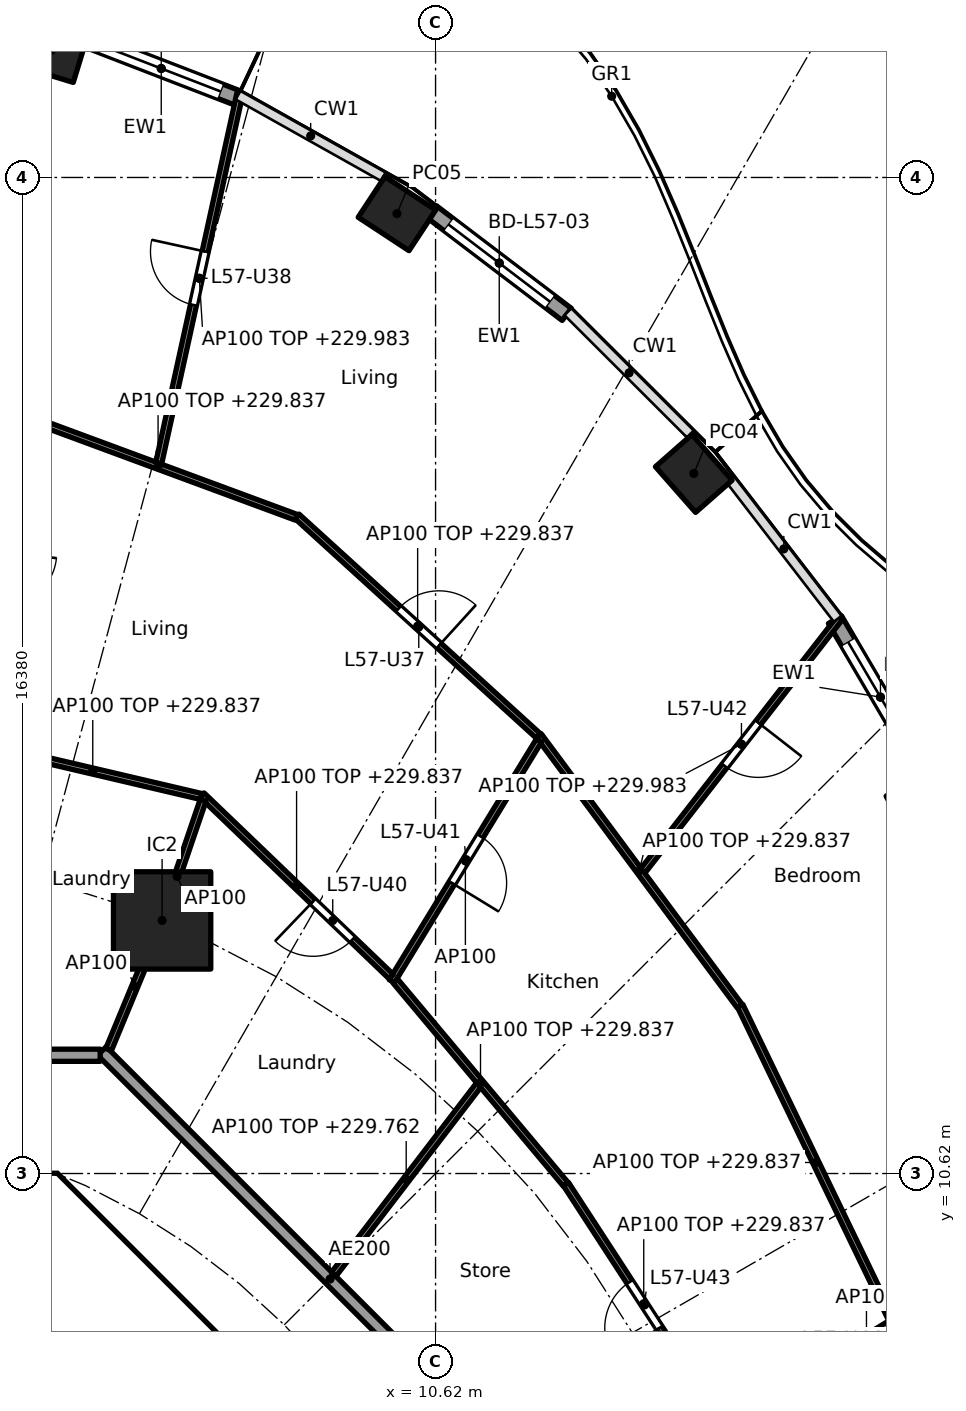
"""IFC4 building model, lengths in metres.
Left out: names, types, materials, properties, quantities, classifications, styles, units other than length and angle.
Written with IfcOpenShell. Run it as: python <this file> out.ifc"""

import sys

from ifc_helpers import new_model, si_unit, direction, frame, frame_2d, origin, origin_2d, place, context, subcontext, project, spatial, polyline, rectangle, hollow_rectangle, outline, extrude, element, fill, save


model = new_model("IFC4")
c1 = context("Model", 3, precision=1e-05, world=origin(), true_north=direction((0.0, 1.0)))
c2 = subcontext(c1, "Body", "Model", "MODEL_VIEW")
j1 = project(units=[si_unit("LENGTHUNIT", "METRE"), si_unit("PLANEANGLEUNIT", "RADIAN")], contexts=[c1])
p1 = place(None, origin())
s1 = spatial("IfcSite", under=j1, at=p1, CompositionType="ELEMENT")
p2 = place(p1, origin())
s2 = spatial("IfcBuilding", under=s1, at=p2, CompositionType="ELEMENT")
p3 = place(p2, frame((0.0, 0.0, 227.0)))
s3 = spatial("IfcBuildingStorey", under=s2, at=p3, CompositionType="ELEMENT", Elevation=227.0)
for number, where, z_axis, x_axis in (
    (1, (18.612, 16.563, 0.0), (0.0, 0.0, 1.0), (-0.452, 0.892, 0.0)),
    (2, (14.866, 22.132, 0.0), (0.0, 0.0, 1.0), (-0.66, 0.751, 0.0)),
    (3, (9.985, 26.405, 0.0), (0.0, 0.0, 1.0), (-0.836, 0.549, 0.0)),
    (4, (4.3, 29.092, 0.0), (0.0, 0.0, 1.0), (-0.957, 0.292, 0.0)),
):
    element("IfcColumn", number, at=place(p3, frame(where, z_axis=z_axis, x_axis=x_axis)), inside=s3, PredefinedType="COLUMN", context=c2, shape_type="SweptSolid", body=[
        extrude(hollow_rectangle(XDim=1.0, YDim=0.8, WallThickness=0.032, at=origin_2d()), origin(), (0.0, 0.0, 1.0), 3.7),
    ])
p4 = place(p3, frame((6.123, 14.782, 0.0), z_axis=(0.0, 0.0, 1.0), x_axis=(1.0, 0.0, 0.0)))
e5 = element("IfcColumn", 5, at=p4, inside=s3, PredefinedType="COLUMN", context=c2, shape_type="SweptSolid", body=[
    extrude(rectangle(XDim=1.6, YDim=1.6, at=origin_2d()), origin(), (0.0, 0.0, 1.0), 3.7),
])
p5 = place(p3, frame((17.188, 19.728, 0.0), z_axis=(0.0, 0.0, 1.0), x_axis=(0.506391620556, -0.862303616269, 0.0)))
e6 = element("IfcWall", 6, at=p5, inside=s3, PredefinedType="SOLIDWALL", context=c2, shape_type="SweptSolid", body=[
    extrude(rectangle(XDim=2.954, YDim=0.25, at=frame_2d((1.477, 0.0))), origin(), (0.0, 0.0, 1.0), 3.44),
])
p6 = place(p5, frame((0.427, 0.0, 0.0)))
e7 = element("IfcOpeningElement", 7, at=p6, cuts=e6, PredefinedType="OPENING", context=c2, shape_type="SweptSolid", body=[
    extrude(rectangle(XDim=2.1, YDim=2.4, at=frame_2d((1.05, 1.2))), frame((0.0, 0.135, 0.0), z_axis=(0.0, -1.0, 0.0), x_axis=(1.0, 0.0, 0.0)), (0.0, 0.0, 1.0), 0.27),
])
p7 = place(p3, frame((10.557, 26.436, 0.0), z_axis=(0.0, 0.0, 1.0), x_axis=(0.796022158395, -0.605267480825, 0.0)))
e8 = element("IfcWall", 8, at=p7, inside=s3, PredefinedType="SOLIDWALL", context=c2, shape_type="SweptSolid", body=[
    extrude(rectangle(XDim=2.789, YDim=0.25, at=frame_2d((1.395, 0.0))), origin(), (0.0, 0.0, 1.0), 3.44),
])
p8 = place(p7, frame((0.344, 0.0, 0.0)))
e9 = element("IfcOpeningElement", 9, at=p8, cuts=e8, PredefinedType="OPENING", context=c2, shape_type="SweptSolid", body=[
    extrude(rectangle(XDim=2.1, YDim=2.4, at=frame_2d((1.05, 1.2))), frame((0.0, 0.135, 0.0), z_axis=(0.0, -1.0, 0.0), x_axis=(1.0, 0.0, 0.0)), (0.0, 0.0, 1.0), 0.27),
])
p9 = place(p3, frame((4.851, 29.278, 0.0), z_axis=(0.0, 0.0, 1.0), x_axis=(0.932838255163, -0.360295420044, 0.0)))
e10 = element("IfcWall", 10, at=p9, inside=s3, PredefinedType="SOLIDWALL", context=c2, shape_type="SweptSolid", body=[
    extrude(rectangle(XDim=2.696, YDim=0.25, at=frame_2d((1.348, 0.0))), origin(), (0.0, 0.0, 1.0), 3.44),
])
p10 = place(p9, frame((0.298, 0.0, 0.0)))
e11 = element("IfcOpeningElement", 11, at=p10, cuts=e10, PredefinedType="OPENING", context=c2, shape_type="SweptSolid", body=[
    extrude(rectangle(XDim=2.1, YDim=2.4, at=frame_2d((1.05, 1.2))), frame((0.0, 0.135, 0.0), z_axis=(0.0, -1.0, 0.0), x_axis=(1.0, 0.0, 0.0)), (0.0, 0.0, 1.0), 0.27),
])
p11 = place(p3, frame((9.988, 4.613, 0.0), z_axis=(0.0, 0.0, 1.0), x_axis=(-0.707106781187, 0.707106781187, 0.0)))
e12 = element("IfcWall", 12, at=p11, inside=s3, PredefinedType="SHEAR", context=c2, shape_type="SweptSolid", body=[
    extrude(rectangle(XDim=7.602, YDim=0.6, at=frame_2d((3.801, 0.0))), origin(), (0.0, 0.0, 1.0), 3.44),
])
p12 = place(p11, frame((3.201, 0.0, 0.0)))
e13 = element("IfcOpeningElement", 13, at=p12, cuts=e12, PredefinedType="OPENING", context=c2, shape_type="SweptSolid", body=[
    extrude(rectangle(XDim=1.2, YDim=2.1, at=frame_2d((0.6, 1.05))), frame((0.0, 0.31, 0.0), z_axis=(0.0, -1.0, 0.0), x_axis=(1.0, 0.0, 0.0)), (0.0, 0.0, 1.0), 0.62),
])
p13 = place(p3, origin())
e14 = element("IfcWall", 14, at=p13, inside=s3, PredefinedType="SHEAR", context=c2, shape_type="SweptSolid", body=[
    extrude(outline(polyline([(-4.152, 10.025), (-4.401, 9.776), (-4.825, 10.2), (-4.401, 10.625), (4.401, 10.625), (4.825, 10.2), (4.401, 9.776), (4.152, 10.025), (-4.152, 10.025)])), origin(), (0.0, 0.0, 1.0), 3.44),
])
p14 = place(p3, frame((12.635, 5.134, 0.0), z_axis=(0.0, 0.0, 1.0), x_axis=(-0.707106781187, 0.707106781187, 0.0)))
e15 = element("IfcWall", 15, at=p14, inside=s3, PredefinedType="PARTITIONING", context=c2, shape_type="SweptSolid", body=[
    extrude(rectangle(XDim=10.609, YDim=0.2, at=frame_2d((5.305, 0.0))), origin(), (0.0, 0.0, 1.0), 3.44),
])
p15 = place(p3, frame((5.104, 12.565, 0.0), z_axis=(0.0, 0.0, 1.0), x_axis=(-1.0, 0.0, 0.0)))
e16 = element("IfcWall", 16, at=p15, inside=s3, PredefinedType="PARTITIONING", context=c2, shape_type="SweptSolid", body=[
    extrude(rectangle(XDim=10.409, YDim=0.2, at=frame_2d((5.205, 0.0))), origin(), (0.0, 0.0, 1.0), 3.44),
])
p16 = place(p15, frame((3.303, 0.0, 0.0)))
e17 = element("IfcOpeningElement", 17, at=p16, cuts=e16, PredefinedType="OPENING", context=c2, shape_type="SweptSolid", body=[
    extrude(rectangle(XDim=1.0, YDim=2.1, at=frame_2d((0.5, 1.05))), frame((0.0, 0.11, 0.0), z_axis=(0.0, -1.0, 0.0), x_axis=(1.0, 0.0, 0.0)), (0.0, 0.0, 1.0), 0.22),
])
p17 = place(p3, frame((14.825, 6.149, 0.0), z_axis=(0.0, 0.0, 1.0), x_axis=(0.852781365284, 0.522268075824, 0.0)))
e18 = element("IfcWall", 18, at=p17, inside=s3, PredefinedType="PARTITIONING", context=c2, shape_type="SweptSolid", body=[
    extrude(rectangle(XDim=6.758, YDim=0.1, at=frame_2d((3.379, 0.0))), origin(), (0.0, 0.0, 1.0), 3.44),
])
p18 = place(p17, frame((1.801, 0.0, 0.0)))
e19 = element("IfcOpeningElement", 19, at=p18, cuts=e18, PredefinedType="OPENING", context=c2, shape_type="SweptSolid", body=[
    extrude(rectangle(XDim=0.9, YDim=2.1, at=frame_2d((0.45, 1.05))), frame((0.0, 0.06, 0.0), z_axis=(0.0, -1.0, 0.0), x_axis=(1.0, 0.0, 0.0)), (0.0, 0.0, 1.0), 0.12),
])
p19 = place(p3, frame((15.323, 6.512, 0.0), z_axis=(0.0, 0.0, 1.0), x_axis=(-0.545191322361, 0.8383116497, 0.0)))
e20 = element("IfcWall", 20, at=p19, inside=s3, PredefinedType="PARTITIONING", context=c2, shape_type="SweptSolid", body=[
    extrude(rectangle(XDim=4.693, YDim=0.1, at=frame_2d((2.346, 0.0))), origin(), (0.0, 0.0, 1.0), 2.837),
])
p20 = place(p19, frame((1.871, 0.0, 0.0)))
e21 = element("IfcOpeningElement", 21, at=p20, cuts=e20, PredefinedType="OPENING", context=c2, shape_type="SweptSolid", body=[
    extrude(rectangle(XDim=0.9, YDim=2.1, at=frame_2d((0.45, 1.05))), frame((0.0, 0.06, 0.0), z_axis=(0.0, -1.0, 0.0), x_axis=(1.0, 0.0, 0.0)), (0.0, 0.0, 1.0), 0.12),
])
p21 = place(p3, frame((18.117, 8.224, 0.0), z_axis=(0.0, 0.0, 1.0), x_axis=(-0.434647681571, 0.900600573453, 0.0)))
e22 = element("IfcWall", 22, at=p21, inside=s3, PredefinedType="PARTITIONING", context=c2, shape_type="SweptSolid", body=[
    extrude(rectangle(XDim=5.724, YDim=0.1, at=frame_2d((2.862, 0.0))), origin(), (0.0, 0.0, 1.0), 2.837),
])
p22 = place(p3, frame((12.759, 10.443, 0.0), z_axis=(0.0, 0.0, 1.0), x_axis=(-0.642225196965, 0.766516011825, 0.0)))
e23 = element("IfcWall", 23, at=p22, inside=s3, PredefinedType="PARTITIONING", context=c2, shape_type="SweptSolid", body=[
    extrude(rectangle(XDim=4.361, YDim=0.1, at=frame_2d((2.18, 0.0))), origin(), (0.0, 0.0, 1.0), 2.837),
])
p23 = place(p3, frame((15.621, 13.374, 0.0), z_axis=(0.0, 0.0, 1.0), x_axis=(-0.596165830899, 0.802861321816, 0.0)))
e24 = element("IfcWall", 24, at=p23, inside=s3, PredefinedType="PARTITIONING", context=c2, shape_type="SweptSolid", body=[
    extrude(rectangle(XDim=5.542, YDim=0.1, at=frame_2d((2.771, 0.0))), origin(), (0.0, 0.0, 1.0), 2.837),
])
p24 = place(p3, frame((8.946, 8.964, 0.0), z_axis=(0.0, 0.0, 1.0), x_axis=(0.608213063121, 0.793773815296, 0.0)))
e25 = element("IfcWall", 25, at=p24, inside=s3, PredefinedType="PARTITIONING", context=c2, shape_type="SweptSolid", body=[
    extrude(rectangle(XDim=3.918, YDim=0.1, at=frame_2d((1.959, 0.0))), origin(), (0.0, 0.0, 1.0), 2.762),
])
p25 = place(p3, frame((14.029, 15.598, 0.0), z_axis=(0.0, 0.0, 1.0), x_axis=(0.614558710688, 0.788871086501, 0.0)))
e26 = element("IfcWall", 26, at=p25, inside=s3, PredefinedType="PARTITIONING", context=c2, shape_type="SweptSolid", body=[
    extrude(rectangle(XDim=5.276, YDim=0.1, at=frame_2d((2.638, 0.0))), origin(), (0.0, 0.0, 1.0), 2.983),
])
p26 = place(p25, frame((2.188, 0.0, 0.0)))
e27 = element("IfcOpeningElement", 27, at=p26, cuts=e26, PredefinedType="OPENING", context=c2, shape_type="SweptSolid", body=[
    extrude(rectangle(XDim=0.9, YDim=2.1, at=frame_2d((0.45, 1.05))), frame((0.0, 0.06, 0.0), z_axis=(0.0, -1.0, 0.0), x_axis=(1.0, 0.0, 0.0)), (0.0, 0.0, 1.0), 0.12),
])
p27 = place(p3, frame((9.9, 13.781, 0.0), z_axis=(0.0, 0.0, 1.0), x_axis=(0.521464905534, 0.853272730313, 0.0)))
e28 = element("IfcWall", 28, at=p27, inside=s3, PredefinedType="PARTITIONING", context=c2, shape_type="SweptSolid", body=[
    extrude(rectangle(XDim=4.641, YDim=0.1, at=frame_2d((2.32, 0.0))), origin(), (0.0, 0.0, 1.0), 3.44),
])
p28 = place(p27, frame((1.895, 0.0, 0.0)))
e29 = element("IfcOpeningElement", 29, at=p28, cuts=e28, PredefinedType="OPENING", context=c2, shape_type="SweptSolid", body=[
    extrude(rectangle(XDim=0.9, YDim=2.1, at=frame_2d((0.45, 1.05))), frame((0.0, 0.06, 0.0), z_axis=(0.0, -1.0, 0.0), x_axis=(1.0, 0.0, 0.0)), (0.0, 0.0, 1.0), 0.12),
])
p29 = place(p3, frame((9.89, 13.858, 0.0), z_axis=(0.0, 0.0, 1.0), x_axis=(-0.72167233993, 0.692234811159, 0.0)))
e30 = element("IfcWall", 30, at=p29, inside=s3, PredefinedType="PARTITIONING", context=c2, shape_type="SweptSolid", body=[
    extrude(rectangle(XDim=4.313, YDim=0.1, at=frame_2d((2.156, 0.0))), origin(), (0.0, 0.0, 1.0), 2.837),
])
p30 = place(p29, frame((0.883, 0.0, 0.0)))
e31 = element("IfcOpeningElement", 31, at=p30, cuts=e30, PredefinedType="OPENING", context=c2, shape_type="SweptSolid", body=[
    extrude(rectangle(XDim=0.9, YDim=2.1, at=frame_2d((0.45, 1.05))), frame((0.0, 0.06, 0.0), z_axis=(0.0, -1.0, 0.0), x_axis=(1.0, 0.0, 0.0)), (0.0, 0.0, 1.0), 0.12),
])
p31 = place(p3, frame((12.31, 17.817, 0.0), z_axis=(0.0, 0.0, 1.0), x_axis=(-0.739697052892, 0.672940019573, 0.0)))
e32 = element("IfcWall", 32, at=p31, inside=s3, PredefinedType="PARTITIONING", context=c2, shape_type="SweptSolid", body=[
    extrude(rectangle(XDim=5.365, YDim=0.1, at=frame_2d((2.683, 0.0))), origin(), (0.0, 0.0, 1.0), 2.837),
])
p32 = place(p31, frame((2.208, 0.0, 0.0)))
e33 = element("IfcOpeningElement", 33, at=p32, cuts=e32, PredefinedType="OPENING", context=c2, shape_type="SweptSolid", body=[
    extrude(rectangle(XDim=0.9, YDim=2.1, at=frame_2d((0.45, 1.05))), frame((0.0, 0.06, 0.0), z_axis=(0.0, -1.0, 0.0), x_axis=(1.0, 0.0, 0.0)), (0.0, 0.0, 1.0), 0.12),
])
p33 = place(p3, frame((5.243, 12.657, 0.0), z_axis=(0.0, 0.0, 1.0), x_axis=(0.382719158442, 0.923864733477, 0.0)))
e34 = element("IfcWall", 34, at=p33, inside=s3, PredefinedType="PARTITIONING", context=c2, shape_type="SweptSolid", body=[
    extrude(rectangle(XDim=2.25, YDim=0.1, at=frame_2d((1.125, 0.0))), origin(), (0.0, 0.0, 1.0), 3.44),
])
p34 = place(p3, frame((6.139, 14.829, 0.0), z_axis=(0.0, 0.0, 1.0), x_axis=(0.32278593828, 0.946471995385, 0.0)))
e35 = element("IfcWall", 35, at=p34, inside=s3, PredefinedType="PARTITIONING", context=c2, shape_type="SweptSolid", body=[
    extrude(rectangle(XDim=2.042, YDim=0.1, at=frame_2d((1.021, 0.0))), origin(), (0.0, 0.0, 1.0), 3.44),
])
p35 = place(p3, frame((6.766, 16.82, 0.0), z_axis=(0.0, 0.0, 1.0), x_axis=(-0.973612608559, 0.22820711745, 0.0)))
e36 = element("IfcWall", 36, at=p35, inside=s3, PredefinedType="PARTITIONING", context=c2, shape_type="SweptSolid", body=[
    extrude(rectangle(XDim=3.663, YDim=0.1, at=frame_2d((1.832, 0.0))), origin(), (0.0, 0.0, 1.0), 2.837),
])
p36 = place(p3, frame((8.331, 21.411, 0.0), z_axis=(0.0, 0.0, 1.0), x_axis=(-0.937891982431, 0.346927412136, 0.0)))
e37 = element("IfcWall", 37, at=p36, inside=s3, PredefinedType="PARTITIONING", context=c2, shape_type="SweptSolid", body=[
    extrude(rectangle(XDim=4.85, YDim=0.1, at=frame_2d((2.425, 0.0))), origin(), (0.0, 0.0, 1.0), 2.837),
])
p37 = place(p3, frame((6.067, 22.301, 0.0), z_axis=(0.0, 0.0, 1.0), x_axis=(0.214401821533, 0.976745544614, 0.0)))
e38 = element("IfcWall", 38, at=p37, inside=s3, PredefinedType="PARTITIONING", context=c2, shape_type="SweptSolid", body=[
    extrude(rectangle(XDim=6.228, YDim=0.1, at=frame_2d((3.114, 0.0))), origin(), (0.0, 0.0, 1.0), 2.983),
])
p38 = place(p37, frame((2.664, 0.0, 0.0)))
e39 = element("IfcOpeningElement", 39, at=p38, cuts=e38, PredefinedType="OPENING", context=c2, shape_type="SweptSolid", body=[
    extrude(rectangle(XDim=0.9, YDim=2.1, at=frame_2d((0.45, 1.05))), frame((0.0, 0.06, 0.0), z_axis=(0.0, -1.0, 0.0), x_axis=(1.0, 0.0, 0.0)), (0.0, 0.0, 1.0), 0.12),
])
p39 = place(p6, origin())
e40 = element("IfcDoor", 40, at=p39, inside=s3, OperationType="SLIDING_TO_LEFT", PredefinedType="DOOR", context=c2, shape_type="SweptSolid", body=[
    extrude(rectangle(XDim=2.1, YDim=2.4, at=frame_2d((1.05, 1.2))), frame((0.0, 0.025, 0.0), z_axis=(0.0, -1.0, 0.0), x_axis=(1.0, 0.0, 0.0)), (0.0, 0.0, 1.0), 0.05),
])
fill(e7, e40)
p40 = place(p8, origin())
e41 = element("IfcDoor", 41, at=p40, inside=s3, OperationType="SLIDING_TO_LEFT", PredefinedType="DOOR", context=c2, shape_type="SweptSolid", body=[
    extrude(rectangle(XDim=2.1, YDim=2.4, at=frame_2d((1.05, 1.2))), frame((0.0, 0.025, 0.0), z_axis=(0.0, -1.0, 0.0), x_axis=(1.0, 0.0, 0.0)), (0.0, 0.0, 1.0), 0.05),
])
fill(e9, e41)
p41 = place(p10, origin())
e42 = element("IfcDoor", 42, at=p41, inside=s3, OperationType="SLIDING_TO_LEFT", PredefinedType="DOOR", context=c2, shape_type="SweptSolid", body=[
    extrude(rectangle(XDim=2.1, YDim=2.4, at=frame_2d((1.05, 1.2))), frame((0.0, 0.025, 0.0), z_axis=(0.0, -1.0, 0.0), x_axis=(1.0, 0.0, 0.0)), (0.0, 0.0, 1.0), 0.05),
])
fill(e11, e42)
p42 = place(p32, frame((0.9, 0.0, 0.0), x_axis=(-1.0, 0.0, 0.0)))
e43 = element("IfcDoor", 43, at=p42, inside=s3, OperationType="SINGLE_SWING_RIGHT", PredefinedType="DOOR", context=c2, shape_type="SweptSolid", body=[
    extrude(rectangle(XDim=0.9, YDim=2.1, at=frame_2d((0.45, 1.05))), frame((0.0, 0.025, 0.0), z_axis=(0.0, -1.0, 0.0), x_axis=(1.0, 0.0, 0.0)), (0.0, 0.0, 1.0), 0.05),
])
fill(e33, e43)
p43 = place(p38, origin())
e44 = element("IfcDoor", 44, at=p43, inside=s3, OperationType="SINGLE_SWING_RIGHT", PredefinedType="DOOR", context=c2, shape_type="SweptSolid", body=[
    extrude(rectangle(XDim=0.9, YDim=2.1, at=frame_2d((0.45, 1.05))), frame((0.0, 0.025, 0.0), z_axis=(0.0, -1.0, 0.0), x_axis=(1.0, 0.0, 0.0)), (0.0, 0.0, 1.0), 0.05),
])
fill(e39, e44)
p44 = place(p30, origin())
e45 = element("IfcDoor", 45, at=p44, inside=s3, OperationType="SINGLE_SWING_RIGHT", PredefinedType="DOOR", context=c2, shape_type="SweptSolid", body=[
    extrude(rectangle(XDim=0.9, YDim=2.1, at=frame_2d((0.45, 1.05))), frame((0.0, 0.025, 0.0), z_axis=(0.0, -1.0, 0.0), x_axis=(1.0, 0.0, 0.0)), (0.0, 0.0, 1.0), 0.05),
])
fill(e31, e45)
p45 = place(p28, frame((0.9, 0.0, 0.0), x_axis=(-1.0, 0.0, 0.0)))
e46 = element("IfcDoor", 46, at=p45, inside=s3, OperationType="SINGLE_SWING_RIGHT", PredefinedType="DOOR", context=c2, shape_type="SweptSolid", body=[
    extrude(rectangle(XDim=0.9, YDim=2.1, at=frame_2d((0.45, 1.05))), frame((0.0, 0.025, 0.0), z_axis=(0.0, -1.0, 0.0), x_axis=(1.0, 0.0, 0.0)), (0.0, 0.0, 1.0), 0.05),
])
fill(e29, e46)
p46 = place(p26, frame((0.9, 0.0, 0.0), x_axis=(-1.0, 0.0, 0.0)))
e47 = element("IfcDoor", 47, at=p46, inside=s3, OperationType="SINGLE_SWING_LEFT", PredefinedType="DOOR", context=c2, shape_type="SweptSolid", body=[
    extrude(rectangle(XDim=0.9, YDim=2.1, at=frame_2d((0.45, 1.05))), frame((0.0, 0.025, 0.0), z_axis=(0.0, -1.0, 0.0), x_axis=(1.0, 0.0, 0.0)), (0.0, 0.0, 1.0), 0.05),
])
fill(e27, e47)
p47 = place(p20, origin())
e48 = element("IfcDoor", 48, at=p47, inside=s3, OperationType="SINGLE_SWING_LEFT", PredefinedType="DOOR", context=c2, shape_type="SweptSolid", body=[
    extrude(rectangle(XDim=0.9, YDim=2.1, at=frame_2d((0.45, 1.05))), frame((0.0, 0.025, 0.0), z_axis=(0.0, -1.0, 0.0), x_axis=(1.0, 0.0, 0.0)), (0.0, 0.0, 1.0), 0.05),
])
fill(e21, e48)
save(model, sys.argv[1])
